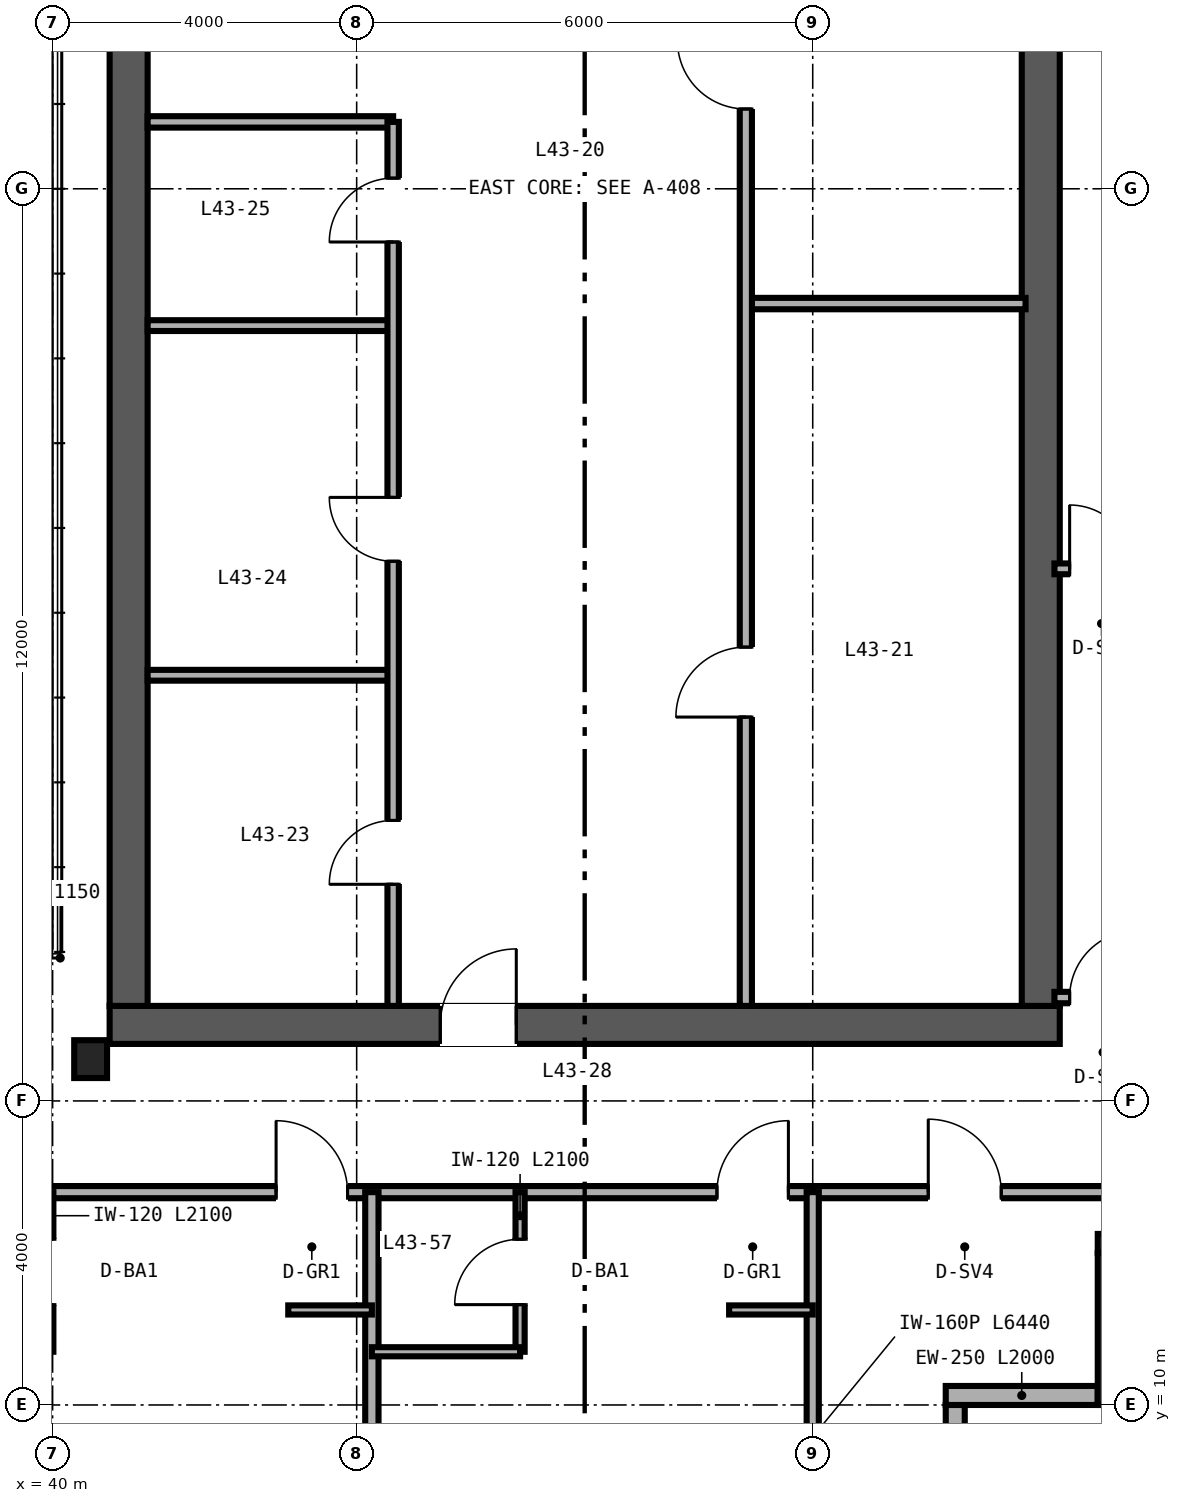
"""IFC4 building model, lengths in metres.
Left out: names, types, materials, properties, quantities, classifications, styles, units other than length and angle.
Written with IfcOpenShell. Run it as: python <this file> out.ifc"""

import sys

from ifc_helpers import new_model, si_unit, direction, frame, frame_2d, origin, origin_2d, place, context, subcontext, project, spatial, rectangle, i_section, extrude, source, transform, mapped, element, fill, save


model = new_model("IFC4")
c1 = context("Model", 3, precision=1e-05, world=origin(), true_north=direction((0.0, 1.0)))
c2 = subcontext(c1, "Body", "Model", "MODEL_VIEW")
j1 = project(units=[si_unit("LENGTHUNIT", "METRE"), si_unit("PLANEANGLEUNIT", "RADIAN")], contexts=[c1])
p1 = place(None, origin())
s1 = spatial("IfcSite", under=j1, at=p1, CompositionType="ELEMENT")
p2 = place(p1, origin())
s2 = spatial("IfcBuilding", under=s1, at=p2, CompositionType="ELEMENT")
p3 = place(p2, frame((0.0, 0.0, 174.0)))
s3 = spatial("IfcBuildingStorey", under=s2, at=p3, CompositionType="ELEMENT", Elevation=174.0)
p4 = place(p3, frame((40.75, 15.0, 0.0), z_axis=(0.0, 0.0, 1.0), x_axis=(1.0, 0.0, 0.0)))
e1 = element("IfcWall", 1, at=p4, inside=s3, PredefinedType="SHEAR", context=c2, shape_type="SweptSolid", body=[
    extrude(rectangle(XDim=12.5, YDim=0.5, at=frame_2d((6.25, 0.0))), origin(), (0.0, 0.0, 1.0), 3.37),
])
p5 = place(p4, frame((4.35, 0.0, 0.0)))
e2 = element("IfcOpeningElement", 2, at=p5, cuts=e1, PredefinedType="OPENING", context=c2, shape_type="SweptSolid", body=[
    extrude(rectangle(XDim=1.0, YDim=2.15, at=frame_2d((0.5, 1.075))), frame((0.0, 0.26, 0.0), z_axis=(0.0, -1.0, 0.0), x_axis=(1.0, 0.0, 0.0)), (0.0, 0.0, 1.0), 0.52),
])
for number, where, z_axis, x_axis in (
    (3, (41.0, 15.25, 0.0), (0.0, 0.0, 1.0), (0.0, 1.0, 0.0)),
    (4, (53.0, 15.25, 0.0), (0.0, 0.0, 1.0), (0.0, 1.0, 0.0)),
):
    element("IfcWall", number, at=place(p3, frame(where, z_axis=z_axis, x_axis=x_axis)), inside=s3, PredefinedType="SHEAR", context=c2, shape_type="SweptSolid", body=[
        extrude(rectangle(XDim=21.5, YDim=0.5, at=frame_2d((10.75, 0.0))), origin(), (0.0, 0.0, 1.0), 3.37),
    ])
m1 = source(origin(), c2, "Body", "SweptSolid", [
    extrude(i_section(OverallWidth=0.432, OverallDepth=0.498, WebThickness=0.056, FlangeThickness=0.089, FilletRadius=0.025, at=origin_2d()), origin(), (0.0, 0.0, 1.0), 3.37),
])
p6 = place(p3, frame((40.5, 14.55, 0.0), z_axis=(0.0, 0.0, 1.0), x_axis=(1.0, 0.0, 0.0)))
e5 = element("IfcColumn", 5, at=p6, inside=s3, PredefinedType="COLUMN", context=c2, shape_type="MappedRepresentation", body=[
    mapped(m1, transform((0.0, 0.0, 0.0), scale=1.0)),
])
p7 = place(p3, frame((51.875, 8.0, 0.0), z_axis=(0.0, 0.0, 1.0), x_axis=(0.0, 1.0, 0.0)))
e6 = element("IfcWall", 6, at=p7, inside=s3, PredefinedType="SOLIDWALL", context=c2, shape_type="SweptSolid", body=[
    extrude(rectangle(XDim=2.0, YDim=0.25, at=frame_2d((1.0, 0.0))), origin(), (0.0, 0.0, 1.0), 3.37),
])
p8 = place(p7, frame((0.5, 0.0, 0.85)))
e7 = element("IfcOpeningElement", 7, at=p8, cuts=e6, PredefinedType="OPENING", context=c2, shape_type="SweptSolid", body=[
    extrude(rectangle(XDim=1.0, YDim=1.9, at=frame_2d((0.5, 0.95))), frame((0.0, 0.135, 0.0), z_axis=(0.0, -1.0, 0.0), x_axis=(1.0, 0.0, 0.0)), (0.0, 0.0, 1.0), 0.27),
])
for number, where, z_axis, x_axis in (
    (8, (51.75, 10.125, 0.0), (0.0, 0.0, 1.0), (1.0, 0.0, 0.0)),
    (9, (53.875, 10.0, 0.0), (0.0, 0.0, 1.0), (0.0, 1.0, 0.0)),
):
    element("IfcWall", number, at=place(p3, frame(where, z_axis=z_axis, x_axis=x_axis)), inside=s3, PredefinedType="SOLIDWALL", context=c2, shape_type="SweptSolid", body=[
        extrude(rectangle(XDim=2.0, YDim=0.25, at=frame_2d((1.0, 0.0))), origin(), (0.0, 0.0, 1.0), 3.37),
    ])
p9 = place(p3, frame((53.75, 12.125, 0.0), z_axis=(0.0, 0.0, 1.0), x_axis=(1.0, 0.0, 0.0)))
e10 = element("IfcWall", 10, at=p9, inside=s3, PredefinedType="SOLIDWALL", context=c2, shape_type="SweptSolid", body=[
    extrude(rectangle(XDim=2.25, YDim=0.25, at=frame_2d((1.125, 0.0))), origin(), (0.0, 0.0, 1.0), 3.37),
])
p10 = place(p3, frame((49.12, 24.49, 0.0), z_axis=(0.0, 0.0, 1.0), x_axis=(1.0, 0.0, 0.0)))
e11 = element("IfcWall", 11, at=p10, inside=s3, PredefinedType="PARTITIONING", context=c2, shape_type="SweptSolid", body=[
    extrude(rectangle(XDim=3.68, YDim=0.15, at=frame_2d((1.84, 0.0))), origin(), (0.0, 0.0, 1.0), 3.37),
])
p11 = place(p3, frame((49.12, 15.25, 0.0), z_axis=(0.0, 0.0, 1.0), x_axis=(0.0, 1.0, 0.0)))
e12 = element("IfcWall", 12, at=p11, inside=s3, PredefinedType="PARTITIONING", context=c2, shape_type="SweptSolid", body=[
    extrude(rectangle(XDim=16.13, YDim=0.16, at=frame_2d((8.065, 0.0))), origin(), (0.0, 0.0, 1.0), 2.443),
])
p12 = place(p11, frame((3.8, 0.0, 0.0)))
e13 = element("IfcOpeningElement", 13, at=p12, cuts=e12, PredefinedType="OPENING", context=c2, shape_type="SweptSolid", body=[
    extrude(rectangle(XDim=0.92, YDim=2.15, at=frame_2d((0.46, 1.075))), frame((0.0, 0.09, 0.0), z_axis=(0.0, -1.0, 0.0), x_axis=(1.0, 0.0, 0.0)), (0.0, 0.0, 1.0), 0.18),
])
p13 = place(p11, frame((11.8, 0.0, 0.0)))
e14 = element("IfcOpeningElement", 14, at=p13, cuts=e12, PredefinedType="OPENING", context=c2, shape_type="SweptSolid", body=[
    extrude(rectangle(XDim=0.9, YDim=2.15, at=frame_2d((0.45, 1.075))), frame((0.0, 0.09, 0.0), z_axis=(0.0, -1.0, 0.0), x_axis=(1.0, 0.0, 0.0)), (0.0, 0.0, 1.0), 0.18),
])
p14 = place(p3, frame((41.25, 26.88, 0.0), z_axis=(0.0, 0.0, 1.0), x_axis=(1.0, 0.0, 0.0)))
e15 = element("IfcWall", 15, at=p14, inside=s3, PredefinedType="PARTITIONING", context=c2, shape_type="SweptSolid", body=[
    extrude(rectangle(XDim=3.23, YDim=0.15, at=frame_2d((1.615, 0.0))), origin(), (0.0, 0.0, 1.0), 3.37),
])
for number, where, z_axis, x_axis in (
    (16, (41.25, 19.6, 0.0), (0.0, 0.0, 1.0), (1.0, 0.0, 0.0)),
    (17, (41.25, 24.2, 0.0), (0.0, 0.0, 1.0), (1.0, 0.0, 0.0)),
):
    element("IfcWall", number, at=place(p3, frame(where, z_axis=z_axis, x_axis=x_axis)), inside=s3, PredefinedType="PARTITIONING", context=c2, shape_type="SweptSolid", body=[
        extrude(rectangle(XDim=3.23, YDim=0.142, at=frame_2d((1.615, 0.0))), origin(), (0.0, 0.0, 1.0), 3.37),
    ])
p15 = place(p3, frame((44.48, 15.25, 0.0), z_axis=(0.0, 0.0, 1.0), x_axis=(0.0, 1.0, 0.0)))
e18 = element("IfcWall", 18, at=p15, inside=s3, PredefinedType="PARTITIONING", context=c2, shape_type="SweptSolid", body=[
    extrude(rectangle(XDim=11.63, YDim=0.15, at=frame_2d((5.815, 0.0))), origin(), (0.0, 0.0, 1.0), 3.37),
])
p16 = place(p15, frame((1.6, 0.0, 0.0)))
e19 = element("IfcOpeningElement", 19, at=p16, cuts=e18, PredefinedType="OPENING", context=c2, shape_type="SweptSolid", body=[
    extrude(rectangle(XDim=0.84, YDim=2.1, at=frame_2d((0.42, 1.05))), frame((0.0, 0.085, 0.0), z_axis=(0.0, -1.0, 0.0), x_axis=(1.0, 0.0, 0.0)), (0.0, 0.0, 1.0), 0.17),
])
p17 = place(p15, frame((5.85, 0.0, 0.0)))
e20 = element("IfcOpeningElement", 20, at=p17, cuts=e18, PredefinedType="OPENING", context=c2, shape_type="SweptSolid", body=[
    extrude(rectangle(XDim=0.84, YDim=2.1, at=frame_2d((0.42, 1.05))), frame((0.0, 0.085, 0.0), z_axis=(0.0, -1.0, 0.0), x_axis=(1.0, 0.0, 0.0)), (0.0, 0.0, 1.0), 0.17),
])
p18 = place(p15, frame((10.05, 0.0, 0.0)))
e21 = element("IfcOpeningElement", 21, at=p18, cuts=e18, PredefinedType="OPENING", context=c2, shape_type="SweptSolid", body=[
    extrude(rectangle(XDim=0.84, YDim=2.1, at=frame_2d((0.42, 1.05))), frame((0.0, 0.085, 0.0), z_axis=(0.0, -1.0, 0.0), x_axis=(1.0, 0.0, 0.0)), (0.0, 0.0, 1.0), 0.17),
])
p19 = place(p3, frame((53.18, 15.36, 0.0), z_axis=(0.0, 0.0, 1.0), x_axis=(1.0, 0.0, 0.0)))
e22 = element("IfcWall", 22, at=p19, inside=s3, PredefinedType="PARTITIONING", context=c2, shape_type="SweptSolid", body=[
    extrude(rectangle(XDim=2.66, YDim=0.15, at=frame_2d((1.33, 0.0))), origin(), (0.0, 0.0, 1.0), 2.591),
])
p20 = place(p19, frame((0.2, 0.0, 0.0)))
e23 = element("IfcOpeningElement", 23, at=p20, cuts=e22, PredefinedType="OPENING", context=c2, shape_type="SweptSolid", body=[
    extrude(rectangle(XDim=0.88, YDim=2.15, at=frame_2d((0.44, 1.075))), frame((0.0, 0.085, 0.0), z_axis=(0.0, -1.0, 0.0), x_axis=(1.0, 0.0, 0.0)), (0.0, 0.0, 1.0), 0.17),
])
p21 = place(p3, frame((53.18, 21.0, 0.0), z_axis=(0.0, 0.0, 1.0), x_axis=(1.0, 0.0, 0.0)))
e24 = element("IfcWall", 24, at=p21, inside=s3, PredefinedType="PARTITIONING", context=c2, shape_type="SweptSolid", body=[
    extrude(rectangle(XDim=2.66, YDim=0.142, at=frame_2d((1.33, 0.0))), origin(), (0.0, 0.0, 1.0), 2.591),
])
p22 = place(p21, frame((0.2, 0.0, 0.0)))
e25 = element("IfcOpeningElement", 25, at=p22, cuts=e24, PredefinedType="OPENING", context=c2, shape_type="SweptSolid", body=[
    extrude(rectangle(XDim=0.84, YDim=2.1, at=frame_2d((0.42, 1.05))), frame((0.0, 0.081, 0.0), z_axis=(0.0, -1.0, 0.0), x_axis=(1.0, 0.0, 0.0)), (0.0, 0.0, 1.0), 0.162),
])
p23 = place(p3, frame((50.0, 12.8, 0.0), z_axis=(0.0, 0.0, 1.0), x_axis=(1.0, 0.0, 0.0)))
e26 = element("IfcWall", 26, at=p23, inside=s3, PredefinedType="PARTITIONING", context=c2, shape_type="SweptSolid", body=[
    extrude(rectangle(XDim=4.0, YDim=0.16, at=frame_2d((2.0, 0.0))), origin(), (0.0, 0.0, 1.0), 3.37),
])
p24 = place(p23, frame((1.52, 0.0, 0.0)))
e27 = element("IfcOpeningElement", 27, at=p24, cuts=e26, PredefinedType="OPENING", context=c2, shape_type="SweptSolid", body=[
    extrude(rectangle(XDim=0.96, YDim=2.15, at=frame_2d((0.48, 1.075))), frame((0.0, 0.09, 0.0), z_axis=(0.0, -1.0, 0.0), x_axis=(1.0, 0.0, 0.0)), (0.0, 0.0, 1.0), 0.18),
])
p25 = place(p3, frame((38.0, 12.8, 0.0), z_axis=(0.0, 0.0, 1.0), x_axis=(1.0, 0.0, 0.0)))
e28 = element("IfcWall", 28, at=p25, inside=s3, PredefinedType="PARTITIONING", context=c2, shape_type="SweptSolid", body=[
    extrude(rectangle(XDim=12.0, YDim=0.16, at=frame_2d((6.0, 0.0))), origin(), (0.0, 0.0, 1.0), 2.913),
])
p26 = place(p25, frame((4.94, 0.0, 0.0)))
e29 = element("IfcOpeningElement", 29, at=p26, cuts=e28, PredefinedType="OPENING", context=c2, shape_type="SweptSolid", body=[
    extrude(rectangle(XDim=0.94, YDim=2.15, at=frame_2d((0.47, 1.075))), frame((0.0, 0.09, 0.0), z_axis=(0.0, -1.0, 0.0), x_axis=(1.0, 0.0, 0.0)), (0.0, 0.0, 1.0), 0.18),
])
p27 = place(p25, frame((10.74, 0.0, 0.0)))
e30 = element("IfcOpeningElement", 30, at=p27, cuts=e28, PredefinedType="OPENING", context=c2, shape_type="SweptSolid", body=[
    extrude(rectangle(XDim=0.94, YDim=2.15, at=frame_2d((0.47, 1.075))), frame((0.0, 0.09, 0.0), z_axis=(0.0, -1.0, 0.0), x_axis=(1.0, 0.0, 0.0)), (0.0, 0.0, 1.0), 0.18),
])
p28 = place(p3, frame((50.0, 6.36, 0.0), z_axis=(0.0, 0.0, 1.0), x_axis=(0.0, 1.0, 0.0)))
e31 = element("IfcWall", 31, at=p28, inside=s3, PredefinedType="PARTITIONING", context=c2, shape_type="SweptSolid", body=[
    extrude(rectangle(XDim=6.44, YDim=0.16, at=frame_2d((3.22, 0.0))), origin(), (0.0, 0.0, 1.0), 2.677),
])
p29 = place(p3, frame((44.2, 6.36, 0.0), z_axis=(0.0, 0.0, 1.0), x_axis=(0.0, 1.0, 0.0)))
e32 = element("IfcWall", 32, at=p29, inside=s3, PredefinedType="PARTITIONING", context=c2, shape_type="SweptSolid", body=[
    extrude(rectangle(XDim=6.44, YDim=0.175, at=frame_2d((3.22, 0.0))), origin(), (0.0, 0.0, 1.0), 2.677),
])
p30 = place(p3, frame((39.95, 10.7, 0.0), z_axis=(0.0, 0.0, 1.0), x_axis=(0.0, 1.0, 0.0)))
e33 = element("IfcWall", 33, at=p30, inside=s3, PredefinedType="PARTITIONING", context=c2, shape_type="SweptSolid", body=[
    extrude(rectangle(XDim=2.1, YDim=0.12, at=frame_2d((1.05, 0.0))), origin(), (0.0, 0.0, 1.0), 3.37),
])
p31 = place(p30, frame((0.62, 0.0, 0.0)))
e34 = element("IfcOpeningElement", 34, at=p31, cuts=e33, PredefinedType="OPENING", context=c2, shape_type="SweptSolid", body=[
    extrude(rectangle(XDim=0.86, YDim=2.1, at=frame_2d((0.43, 1.05))), frame((0.0, 0.07, 0.0), z_axis=(0.0, -1.0, 0.0), x_axis=(1.0, 0.0, 0.0)), (0.0, 0.0, 1.0), 0.14),
])
p32 = place(p3, frame((43.1, 11.25, 0.0), z_axis=(0.0, 0.0, 1.0), x_axis=(1.0, 0.0, 0.0)))
e35 = element("IfcWall", 35, at=p32, inside=s3, PredefinedType="PARTITIONING", context=c2, shape_type="SweptSolid", body=[
    extrude(rectangle(XDim=1.1, YDim=0.12, at=frame_2d((0.55, 0.0))), origin(), (0.0, 0.0, 1.0), 3.37),
])
p33 = place(p3, frame((46.15, 10.7, 0.0), z_axis=(0.0, 0.0, 1.0), x_axis=(0.0, 1.0, 0.0)))
e36 = element("IfcWall", 36, at=p33, inside=s3, PredefinedType="PARTITIONING", context=c2, shape_type="SweptSolid", body=[
    extrude(rectangle(XDim=2.1, YDim=0.12, at=frame_2d((1.05, 0.0))), origin(), (0.0, 0.0, 1.0), 3.37),
])
p34 = place(p33, frame((0.62, 0.0, 0.0)))
e37 = element("IfcOpeningElement", 37, at=p34, cuts=e36, PredefinedType="OPENING", context=c2, shape_type="SweptSolid", body=[
    extrude(rectangle(XDim=0.86, YDim=2.1, at=frame_2d((0.43, 1.05))), frame((0.0, 0.07, 0.0), z_axis=(0.0, -1.0, 0.0), x_axis=(1.0, 0.0, 0.0)), (0.0, 0.0, 1.0), 0.14),
])
p35 = place(p3, frame((44.2, 10.7, 0.0), z_axis=(0.0, 0.0, 1.0), x_axis=(1.0, 0.0, 0.0)))
e38 = element("IfcWall", 38, at=p35, inside=s3, PredefinedType="PARTITIONING", context=c2, shape_type="SweptSolid", body=[
    extrude(rectangle(XDim=1.95, YDim=0.12, at=frame_2d((0.975, 0.0))), origin(), (0.0, 0.0, 1.0), 3.37),
])
p36 = place(p3, frame((48.9, 11.25, 0.0), z_axis=(0.0, 0.0, 1.0), x_axis=(1.0, 0.0, 0.0)))
e39 = element("IfcWall", 39, at=p36, inside=s3, PredefinedType="PARTITIONING", context=c2, shape_type="SweptSolid", body=[
    extrude(rectangle(XDim=1.1, YDim=0.12, at=frame_2d((0.55, 0.0))), origin(), (0.0, 0.0, 1.0), 3.37),
])
m2 = source(origin(), c2, "Body", "SweptSolid", [
    extrude(rectangle(XDim=1.0, YDim=2.15, at=frame_2d((0.5, 1.075))), frame((0.0, 0.025, 0.0), z_axis=(0.0, -1.0, 0.0), x_axis=(1.0, 0.0, 0.0)), (0.0, 0.0, 1.0), 0.05),
])
p37 = place(p5, origin())
e40 = element("IfcDoor", 40, at=p37, inside=s3, OperationType="SINGLE_SWING_RIGHT", PredefinedType="DOOR", context=c2, shape_type="MappedRepresentation", body=[
    mapped(m2, transform((0.0, 0.0, 0.0), scale=1.0)),
])
fill(e2, e40)
m3 = source(origin(), c2, "Body", "SweptSolid", [
    extrude(rectangle(XDim=0.92, YDim=2.15, at=frame_2d((0.46, 1.075))), frame((0.0, 0.025, 0.0), z_axis=(0.0, -1.0, 0.0), x_axis=(1.0, 0.0, 0.0)), (0.0, 0.0, 1.0), 0.05),
])
p38 = place(p12, origin())
e41 = element("IfcDoor", 41, at=p38, inside=s3, OperationType="SINGLE_SWING_LEFT", PredefinedType="DOOR", context=c2, shape_type="MappedRepresentation", body=[
    mapped(m3, transform((0.0, 0.0, 0.0), scale=1.0)),
])
fill(e13, e41)
m4 = source(origin(), c2, "Body", "SweptSolid", [
    extrude(rectangle(XDim=0.9, YDim=2.15, at=frame_2d((0.45, 1.075))), frame((0.0, 0.025, 0.0), z_axis=(0.0, -1.0, 0.0), x_axis=(1.0, 0.0, 0.0)), (0.0, 0.0, 1.0), 0.05),
])
p39 = place(p13, origin())
e42 = element("IfcDoor", 42, at=p39, inside=s3, OperationType="SINGLE_SWING_RIGHT", PredefinedType="DOOR", context=c2, shape_type="MappedRepresentation", body=[
    mapped(m4, transform((0.0, 0.0, 0.0), scale=1.0)),
])
fill(e14, e42)
m5 = source(origin(), c2, "Body", "SweptSolid", [
    extrude(rectangle(XDim=0.84, YDim=2.1, at=frame_2d((0.42, 1.05))), frame((0.0, 0.025, 0.0), z_axis=(0.0, -1.0, 0.0), x_axis=(1.0, 0.0, 0.0)), (0.0, 0.0, 1.0), 0.05),
])
p40 = place(p16, origin())
e43 = element("IfcDoor", 43, at=p40, inside=s3, OperationType="SINGLE_SWING_LEFT", PredefinedType="DOOR", context=c2, shape_type="MappedRepresentation", body=[
    mapped(m5, transform((0.0, 0.0, 0.0), scale=1.0)),
])
fill(e19, e43)
p41 = place(p17, origin())
e44 = element("IfcDoor", 44, at=p41, inside=s3, OperationType="SINGLE_SWING_RIGHT", PredefinedType="DOOR", context=c2, shape_type="MappedRepresentation", body=[
    mapped(m5, transform((0.0, 0.0, 0.0), scale=1.0)),
])
fill(e20, e44)
p42 = place(p18, origin())
e45 = element("IfcDoor", 45, at=p42, inside=s3, OperationType="SINGLE_SWING_LEFT", PredefinedType="DOOR", context=c2, shape_type="MappedRepresentation", body=[
    mapped(m5, transform((0.0, 0.0, 0.0), scale=1.0)),
])
fill(e21, e45)
m6 = source(origin(), c2, "Body", "SweptSolid", [
    extrude(rectangle(XDim=0.88, YDim=2.15, at=frame_2d((0.44, 1.075))), frame((0.0, 0.025, 0.0), z_axis=(0.0, -1.0, 0.0), x_axis=(1.0, 0.0, 0.0)), (0.0, 0.0, 1.0), 0.05),
])
p43 = place(p20, origin())
e46 = element("IfcDoor", 46, at=p43, inside=s3, OperationType="SINGLE_SWING_RIGHT", PredefinedType="DOOR", context=c2, shape_type="MappedRepresentation", body=[
    mapped(m6, transform((0.0, 0.0, 0.0), scale=1.0)),
])
fill(e23, e46)
p44 = place(p22, origin())
e47 = element("IfcDoor", 47, at=p44, inside=s3, OperationType="SINGLE_SWING_LEFT", PredefinedType="DOOR", context=c2, shape_type="MappedRepresentation", body=[
    mapped(m5, transform((0.0, 0.0, 0.0), scale=1.0)),
])
fill(e25, e47)
m7 = source(origin(), c2, "Body", "SweptSolid", [
    extrude(rectangle(XDim=0.96, YDim=2.15, at=frame_2d((0.48, 1.075))), frame((0.0, 0.025, 0.0), z_axis=(0.0, -1.0, 0.0), x_axis=(1.0, 0.0, 0.0)), (0.0, 0.0, 1.0), 0.05),
])
p45 = place(p24, origin())
e48 = element("IfcDoor", 48, at=p45, inside=s3, OperationType="SINGLE_SWING_LEFT", PredefinedType="DOOR", context=c2, shape_type="MappedRepresentation", body=[
    mapped(m7, transform((0.0, 0.0, 0.0), scale=1.0)),
])
fill(e27, e48)
m8 = source(origin(), c2, "Body", "SweptSolid", [
    extrude(rectangle(XDim=0.86, YDim=2.1, at=frame_2d((0.43, 1.05))), frame((0.0, 0.025, 0.0), z_axis=(0.0, -1.0, 0.0), x_axis=(1.0, 0.0, 0.0)), (0.0, 0.0, 1.0), 0.05),
])
p46 = place(p34, origin())
e49 = element("IfcDoor", 49, at=p46, inside=s3, OperationType="SINGLE_SWING_LEFT", PredefinedType="DOOR", context=c2, shape_type="MappedRepresentation", body=[
    mapped(m8, transform((0.0, 0.0, 0.0), scale=1.0)),
])
fill(e37, e49)
m9 = source(origin(), c2, "Body", "SweptSolid", [
    extrude(rectangle(XDim=0.94, YDim=2.15, at=frame_2d((0.47, 1.075))), frame((0.0, 0.025, 0.0), z_axis=(0.0, -1.0, 0.0), x_axis=(1.0, 0.0, 0.0)), (0.0, 0.0, 1.0), 0.05),
])
p47 = place(p26, origin())
e50 = element("IfcDoor", 50, at=p47, inside=s3, OperationType="SINGLE_SWING_LEFT", PredefinedType="DOOR", context=c2, shape_type="MappedRepresentation", body=[
    mapped(m9, transform((0.0, 0.0, 0.0), scale=1.0)),
])
fill(e29, e50)
p48 = place(p27, origin())
e51 = element("IfcDoor", 51, at=p48, inside=s3, OperationType="SINGLE_SWING_RIGHT", PredefinedType="DOOR", context=c2, shape_type="MappedRepresentation", body=[
    mapped(m9, transform((0.0, 0.0, 0.0), scale=1.0)),
])
fill(e30, e51)
save(model, sys.argv[1])
